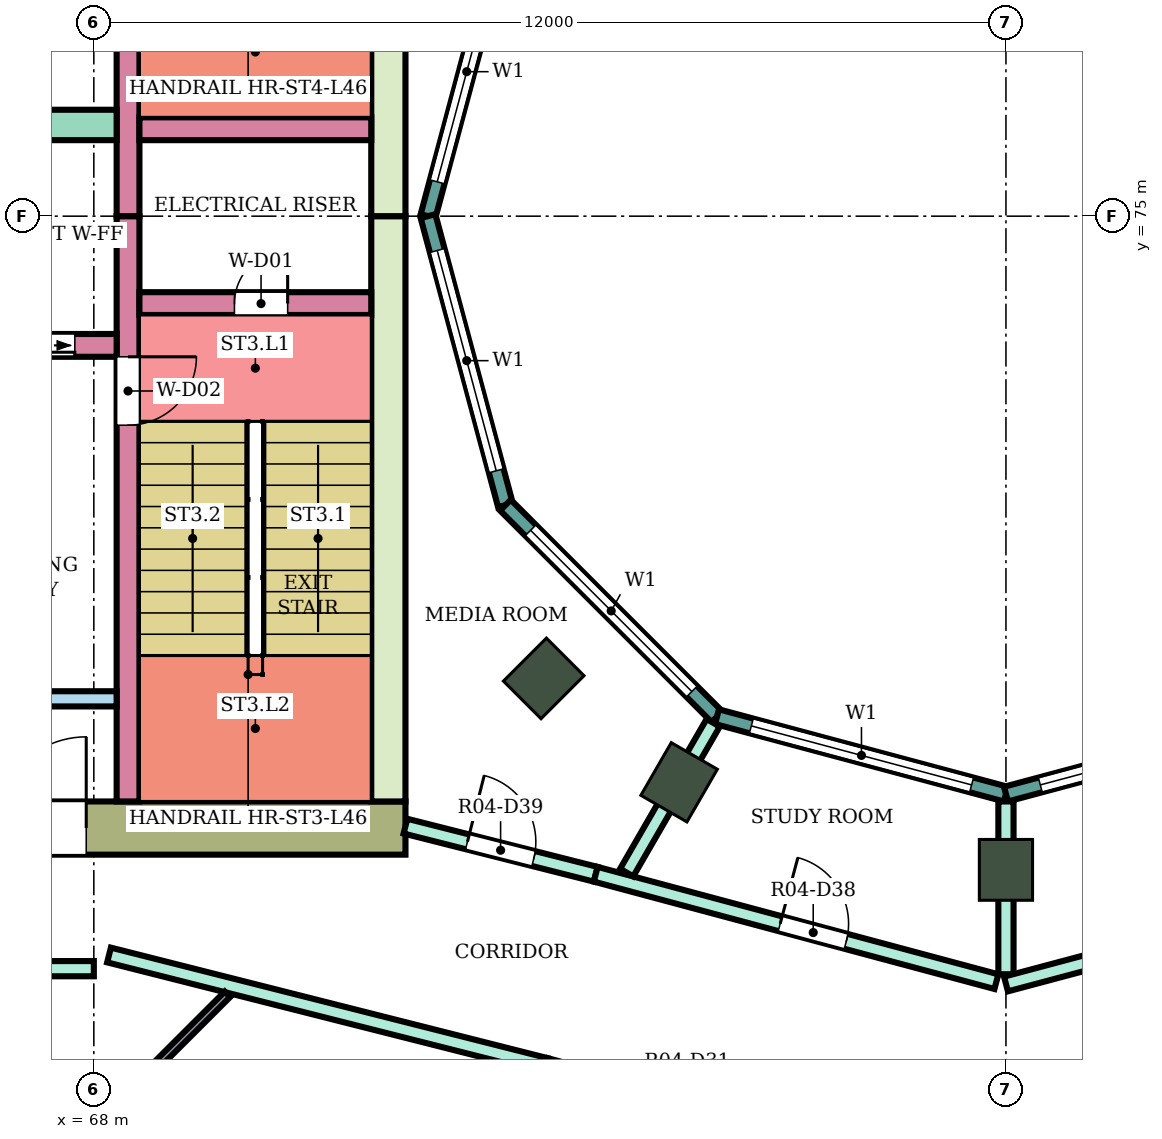
"""IFC4 building model, lengths in metres.
Left out: names, types, materials, properties, quantities, classifications, styles, units other than length and angle.
Written with IfcOpenShell. Run it as: python <this file> out.ifc"""

import sys

from ifc_helpers import new_model, si_unit, direction, frame, frame_2d, origin, origin_2d, place, context, subcontext, project, spatial, rectangle, extrude, element, fill, save


model = new_model("IFC4")
c1 = context("Model", 3, precision=1e-05, world=origin(), true_north=direction((0.0, 1.0)))
c2 = subcontext(c1, "Body", "Model", "MODEL_VIEW")
j1 = project(units=[si_unit("LENGTHUNIT", "METRE"), si_unit("PLANEANGLEUNIT", "RADIAN")], contexts=[c1])
p1 = place(None, origin())
s1 = spatial("IfcSite", under=j1, at=p1, CompositionType="ELEMENT")
p2 = place(p1, origin())
s2 = spatial("IfcBuilding", under=s1, at=p2, CompositionType="ELEMENT")
p3 = place(p2, frame((0.0, 0.0, 198.7)))
s3 = spatial("IfcBuildingStorey", under=s2, at=p3, CompositionType="ELEMENT", Elevation=198.7)
for number, where, z_axis, x_axis in (
    (1, (73.919, 68.919, 0.0), (0.0, 0.0, 1.0), (-0.707, -0.707, 0.0)),
    (2, (75.7, 67.552, 0.0), (0.0, 0.0, 1.0), (-0.5, -0.866, 0.0)),
    (3, (80.0, 66.4, 0.0), (0.0, 0.0, 1.0), (0.0, -1.0, 0.0)),
):
    element("IfcColumn", number, at=place(p3, frame(where, z_axis=z_axis, x_axis=x_axis)), inside=s3, PredefinedType="COLUMN", context=c2, shape_type="SweptSolid", body=[
        extrude(rectangle(XDim=0.8, YDim=0.7, at=origin_2d()), origin(), (0.0, 0.0, 1.0), 4.1),
    ])
p4 = place(p3, frame((72.1, 66.95, 0.0), z_axis=(0.0, 0.0, 1.0), x_axis=(-1.0, 0.0, 0.0)))
e4 = element("IfcWall", 4, at=p4, inside=s3, PredefinedType="SHEAR", context=c2, shape_type="SweptSolid", body=[
    extrude(rectangle(XDim=14.8, YDim=0.7, at=frame_2d((7.4, 0.0))), origin(), (0.0, 0.0, 1.0), 3.78),
])
p5 = place(p4, frame((4.2, 0.0, 0.0)))
e5 = element("IfcOpeningElement", 5, at=p5, cuts=e4, PredefinedType="OPENING", context=c2, shape_type="SweptSolid", body=[
    extrude(rectangle(XDim=2.4, YDim=2.4, at=frame_2d((1.2, 1.2))), frame((0.0, 0.36, 0.0), z_axis=(0.0, -1.0, 0.0), x_axis=(1.0, 0.0, 0.0)), (0.0, 0.0, 1.0), 0.72),
])
for number, where, z_axis, x_axis in (
    (6, (71.875, 75.0, 0.0), (0.0, 0.0, 1.0), (0.0, -1.0, 0.0)),
    (7, (71.875, 82.7, 0.0), (0.0, 0.0, 1.0), (0.0, -1.0, 0.0)),
):
    element("IfcWall", number, at=place(p3, frame(where, z_axis=z_axis, x_axis=x_axis)), inside=s3, PredefinedType="SHEAR", context=c2, shape_type="SweptSolid", body=[
        extrude(rectangle(XDim=7.7, YDim=0.45, at=frame_2d((3.85, 0.0))), origin(), (0.0, 0.0, 1.0), 3.78),
    ])
p6 = place(p3, frame((68.45, 75.0, 0.0), z_axis=(0.0, 0.0, 1.0), x_axis=(0.0, -1.0, 0.0)))
e8 = element("IfcWall", 8, at=p6, inside=s3, PredefinedType="SHEAR", context=c2, shape_type="SweptSolid", body=[
    extrude(rectangle(XDim=7.7, YDim=0.3, at=frame_2d((3.85, 0.0))), origin(), (0.0, 0.0, 1.0), 3.78),
])
p7 = place(p6, frame((1.85, 0.0, 0.0)))
e9 = element("IfcOpeningElement", 9, at=p7, cuts=e8, PredefinedType="OPENING", context=c2, shape_type="SweptSolid", body=[
    extrude(rectangle(XDim=0.9, YDim=2.1, at=frame_2d((0.45, 1.05))), frame((0.0, 0.16, 0.0), z_axis=(0.0, -1.0, 0.0), x_axis=(1.0, 0.0, 0.0)), (0.0, 0.0, 1.0), 0.32),
])
p8 = place(p3, frame((68.45, 82.7, 0.0), z_axis=(0.0, 0.0, 1.0), x_axis=(0.0, -1.0, 0.0)))
e10 = element("IfcWall", 10, at=p8, inside=s3, PredefinedType="SHEAR", context=c2, shape_type="SweptSolid", body=[
    extrude(rectangle(XDim=7.7, YDim=0.3, at=frame_2d((3.85, 0.0))), origin(), (0.0, 0.0, 1.0), 3.78),
])
p9 = place(p8, frame((0.35, 0.0, 0.0)))
e11 = element("IfcOpeningElement", 11, at=p9, cuts=e10, PredefinedType="OPENING", context=c2, shape_type="SweptSolid", body=[
    extrude(rectangle(XDim=0.9, YDim=2.1, at=frame_2d((0.45, 1.05))), frame((0.0, 0.16, 0.0), z_axis=(0.0, -1.0, 0.0), x_axis=(1.0, 0.0, 0.0)), (0.0, 0.0, 1.0), 0.32),
])
p10 = place(p3, frame((71.65, 73.85, 0.0), z_axis=(0.0, 0.0, 1.0), x_axis=(-1.0, 0.0, 0.0)))
e12 = element("IfcWall", 12, at=p10, inside=s3, PredefinedType="SHEAR", context=c2, shape_type="SweptSolid", body=[
    extrude(rectangle(XDim=3.05, YDim=0.3, at=frame_2d((1.525, 0.0))), origin(), (0.0, 0.0, 1.0), 3.78),
])
p11 = place(p10, frame((1.1, 0.0, 0.0)))
e13 = element("IfcOpeningElement", 13, at=p11, cuts=e12, PredefinedType="OPENING", context=c2, shape_type="SweptSolid", body=[
    extrude(rectangle(XDim=0.7, YDim=2.0, at=frame_2d((0.35, 1.0))), frame((0.0, 0.16, 0.0), z_axis=(0.0, -1.0, 0.0), x_axis=(1.0, 0.0, 0.0)), (0.0, 0.0, 1.0), 0.32),
])
p12 = place(p3, frame((71.65, 76.15, 0.0), z_axis=(0.0, 0.0, 1.0), x_axis=(-1.0, 0.0, 0.0)))
e14 = element("IfcWall", 14, at=p12, inside=s3, PredefinedType="SHEAR", context=c2, shape_type="SweptSolid", body=[
    extrude(rectangle(XDim=3.05, YDim=0.3, at=frame_2d((1.525, 0.0))), origin(), (0.0, 0.0, 1.0), 3.78),
])
p13 = place(p3, frame((68.3, 73.3, 0.0), z_axis=(0.0, 0.0, 1.0), x_axis=(-1.0, 0.0, 0.0)))
e15 = element("IfcWall", 15, at=p13, inside=s3, PredefinedType="SHEAR", context=c2, shape_type="SweptSolid", body=[
    extrude(rectangle(XDim=11.0, YDim=0.3, at=frame_2d((5.5, 0.0))), origin(), (0.0, 0.0, 1.0), 3.78),
])
p14 = place(p13, frame((0.55, 0.0, 0.0)))
e16 = element("IfcOpeningElement", 16, at=p14, cuts=e15, PredefinedType="OPENING", context=c2, shape_type="SweptSolid", body=[
    extrude(rectangle(XDim=1.1, YDim=2.1, at=frame_2d((0.55, 1.05))), frame((0.0, 0.16, 0.0), z_axis=(0.0, -1.0, 0.0), x_axis=(1.0, 0.0, 0.0)), (0.0, 0.0, 1.0), 0.32),
])
p15 = place(p13, frame((3.0, 0.0, 0.0)))
e17 = element("IfcOpeningElement", 17, at=p15, cuts=e15, PredefinedType="OPENING", context=c2, shape_type="SweptSolid", body=[
    extrude(rectangle(XDim=1.2, YDim=2.1, at=frame_2d((0.6, 1.05))), frame((0.0, 0.16, 0.0), z_axis=(0.0, -1.0, 0.0), x_axis=(1.0, 0.0, 0.0)), (0.0, 0.0, 1.0), 0.32),
])
p16 = place(p13, frame((5.5, 0.0, 0.0)))
e18 = element("IfcOpeningElement", 18, at=p16, cuts=e15, PredefinedType="OPENING", context=c2, shape_type="SweptSolid", body=[
    extrude(rectangle(XDim=1.2, YDim=2.1, at=frame_2d((0.6, 1.05))), frame((0.0, 0.16, 0.0), z_axis=(0.0, -1.0, 0.0), x_axis=(1.0, 0.0, 0.0)), (0.0, 0.0, 1.0), 0.32),
])
p17 = place(p13, frame((8.8, 0.0, 0.0)))
e19 = element("IfcOpeningElement", 19, at=p17, cuts=e15, PredefinedType="OPENING", context=c2, shape_type="SweptSolid", body=[
    extrude(rectangle(XDim=0.9, YDim=2.1, at=frame_2d((0.45, 1.05))), frame((0.0, 0.16, 0.0), z_axis=(0.0, -1.0, 0.0), x_axis=(1.0, 0.0, 0.0)), (0.0, 0.0, 1.0), 0.32),
])
p18 = place(p3, frame((68.3, 76.2, 0.0), z_axis=(0.0, 0.0, 1.0), x_axis=(-1.0, 0.0, 0.0)))
e20 = element("IfcWall", 20, at=p18, inside=s3, PredefinedType="SHEAR", context=c2, shape_type="SweptSolid", body=[
    extrude(rectangle(XDim=11.0, YDim=0.4, at=frame_2d((5.5, 0.0))), origin(), (0.0, 0.0, 1.0), 3.78),
])
p19 = place(p3, frame((68.3, 68.65, 0.0), z_axis=(0.0, 0.0, 1.0), x_axis=(-1.0, 0.0, 0.0)))
e21 = element("IfcWall", 21, at=p19, inside=s3, PredefinedType="SHEAR", context=c2, shape_type="SweptSolid", body=[
    extrude(rectangle(XDim=4.5, YDim=0.2, at=frame_2d((2.25, 0.0))), origin(), (0.0, 0.0, 1.0), 3.78),
])
p20 = place(p3, frame((73.415, 78.802, 0.0), z_axis=(0.0, 0.0, 1.0), x_axis=(-0.258789828301, -0.965933654434, 0.0)))
e22 = element("IfcWall", 22, at=p20, inside=s3, PredefinedType="NOTDEFINED", context=c2, shape_type="SweptSolid", body=[
    extrude(rectangle(XDim=3.936, YDim=0.2, at=frame_2d((1.968, 0.0))), origin(), (0.0, 0.0, 1.0), 4.1),
])
p21 = place(p20, frame((0.468, 0.0, 0.9)))
e23 = element("IfcOpeningElement", 23, at=p21, cuts=e22, PredefinedType="OPENING", context=c2, shape_type="SweptSolid", body=[
    extrude(rectangle(XDim=3.0, YDim=2.3, at=frame_2d((1.5, 1.15))), frame((0.0, 0.11, 0.0), z_axis=(0.0, -1.0, 0.0), x_axis=(1.0, 0.0, 0.0)), (0.0, 0.0, 1.0), 0.22),
])
p22 = place(p3, frame((72.396, 75.0, 0.0), z_axis=(0.0, 0.0, 1.0), x_axis=(0.258789828301, -0.965933654434, 0.0)))
e24 = element("IfcWall", 24, at=p22, inside=s3, PredefinedType="NOTDEFINED", context=c2, shape_type="SweptSolid", body=[
    extrude(rectangle(XDim=3.936, YDim=0.2, at=frame_2d((1.968, 0.0))), origin(), (0.0, 0.0, 1.0), 4.1),
])
p23 = place(p22, frame((0.468, 0.0, 0.9)))
e25 = element("IfcOpeningElement", 25, at=p23, cuts=e24, PredefinedType="OPENING", context=c2, shape_type="SweptSolid", body=[
    extrude(rectangle(XDim=3.0, YDim=2.3, at=frame_2d((1.5, 1.15))), frame((0.0, 0.11, 0.0), z_axis=(0.0, -1.0, 0.0), x_axis=(1.0, 0.0, 0.0)), (0.0, 0.0, 1.0), 0.22),
])
p24 = place(p3, frame((73.415, 71.198, 0.0), z_axis=(0.0, 0.0, 1.0), x_axis=(0.707106781187, -0.707106781187, 0.0)))
e26 = element("IfcWall", 26, at=p24, inside=s3, PredefinedType="NOTDEFINED", context=c2, shape_type="SweptSolid", body=[
    extrude(rectangle(XDim=3.936, YDim=0.2, at=frame_2d((1.968, 0.0))), origin(), (0.0, 0.0, 1.0), 4.1),
])
p25 = place(p24, frame((0.468, 0.0, 0.9)))
e27 = element("IfcOpeningElement", 27, at=p25, cuts=e26, PredefinedType="OPENING", context=c2, shape_type="SweptSolid", body=[
    extrude(rectangle(XDim=3.0, YDim=2.3, at=frame_2d((1.5, 1.15))), frame((0.0, 0.11, 0.0), z_axis=(0.0, -1.0, 0.0), x_axis=(1.0, 0.0, 0.0)), (0.0, 0.0, 1.0), 0.22),
])
p26 = place(p3, frame((76.198, 68.415, 0.0), z_axis=(0.0, 0.0, 1.0), x_axis=(0.965933654434, -0.258789828301, 0.0)))
e28 = element("IfcWall", 28, at=p26, inside=s3, PredefinedType="NOTDEFINED", context=c2, shape_type="SweptSolid", body=[
    extrude(rectangle(XDim=3.936, YDim=0.2, at=frame_2d((1.968, 0.0))), origin(), (0.0, 0.0, 1.0), 4.1),
])
p27 = place(p26, frame((0.468, 0.0, 0.9)))
e29 = element("IfcOpeningElement", 29, at=p27, cuts=e28, PredefinedType="OPENING", context=c2, shape_type="SweptSolid", body=[
    extrude(rectangle(XDim=3.0, YDim=2.3, at=frame_2d((1.5, 1.15))), frame((0.0, 0.11, 0.0), z_axis=(0.0, -1.0, 0.0), x_axis=(1.0, 0.0, 0.0)), (0.0, 0.0, 1.0), 0.22),
])
p28 = place(p3, frame((80.0, 67.396, 0.0), z_axis=(0.0, 0.0, 1.0), x_axis=(0.965933654434, 0.258789828301, 0.0)))
e30 = element("IfcWall", 30, at=p28, inside=s3, PredefinedType="NOTDEFINED", context=c2, shape_type="SweptSolid", body=[
    extrude(rectangle(XDim=3.936, YDim=0.2, at=frame_2d((1.968, 0.0))), origin(), (0.0, 0.0, 1.0), 4.1),
])
p29 = place(p28, frame((0.468, 0.0, 0.9)))
e31 = element("IfcOpeningElement", 31, at=p29, cuts=e30, PredefinedType="OPENING", context=c2, shape_type="SweptSolid", body=[
    extrude(rectangle(XDim=3.0, YDim=2.3, at=frame_2d((1.5, 1.15))), frame((0.0, 0.11, 0.0), z_axis=(0.0, -1.0, 0.0), x_axis=(1.0, 0.0, 0.0)), (0.0, 0.0, 1.0), 0.22),
])
p30 = place(p3, frame((65.2, 65.1, 0.0), z_axis=(0.0, 0.0, 1.0), x_axis=(1.0, 0.0, 0.0)))
e32 = element("IfcWall", 32, at=p30, inside=s3, PredefinedType="PARTITIONING", context=c2, shape_type="SweptSolid", body=[
    extrude(rectangle(XDim=2.8, YDim=0.2, at=frame_2d((1.4, 0.0))), origin(), (0.0, 0.0, 1.0), 3.65),
])
p31 = place(p3, frame((68.2, 65.28, 0.0), z_axis=(0.0, 0.0, 1.0), x_axis=(0.969450596516, -0.245286650503, 0.0)))
e33 = element("IfcWall", 33, at=p31, inside=s3, PredefinedType="PARTITIONING", context=c2, shape_type="SweptSolid", body=[
    extrude(rectangle(XDim=5.928, YDim=0.2, at=frame_2d((2.964, 0.0))), origin(), (0.0, 0.0, 1.0), 3.65),
])
p32 = place(p3, frame((72.1, 66.975, 0.0), z_axis=(0.0, 0.0, 1.0), x_axis=(0.969471314457, -0.245204752086, 0.0)))
e34 = element("IfcWall", 34, at=p32, inside=s3, PredefinedType="PARTITIONING", context=c2, shape_type="SweptSolid", body=[
    extrude(rectangle(XDim=2.582, YDim=0.2, at=frame_2d((1.291, 0.0))), origin(), (0.0, 0.0, 1.0), 3.65),
])
p33 = place(p32, frame((0.841, 0.0, 0.0)))
e35 = element("IfcOpeningElement", 35, at=p33, cuts=e34, PredefinedType="OPENING", context=c2, shape_type="SweptSolid", body=[
    extrude(rectangle(XDim=0.9, YDim=2.1, at=frame_2d((0.45, 1.05))), frame((0.0, 0.11, 0.0), z_axis=(0.0, -1.0, 0.0), x_axis=(1.0, 0.0, 0.0)), (0.0, 0.0, 1.0), 0.22),
])
p34 = place(p3, frame((73.947, 63.826, 0.0), z_axis=(0.0, 0.0, 1.0), x_axis=(0.965908253407, -0.258884619088, 0.0)))
e36 = element("IfcWall", 36, at=p34, inside=s3, PredefinedType="PARTITIONING", context=c2, shape_type="SweptSolid", body=[
    extrude(rectangle(XDim=6.217, YDim=0.2, at=frame_2d((3.108, 0.0))), origin(), (0.0, 0.0, 1.0), 3.65),
])
p35 = place(p34, frame((1.424, 0.0, 0.0)))
e37 = element("IfcOpeningElement", 37, at=p35, cuts=e36, PredefinedType="OPENING", context=c2, shape_type="SweptSolid", body=[
    extrude(rectangle(XDim=1.0, YDim=2.1, at=frame_2d((0.5, 1.05))), frame((0.0, 0.11, 0.0), z_axis=(0.0, -1.0, 0.0), x_axis=(1.0, 0.0, 0.0)), (0.0, 0.0, 1.0), 0.22),
])
p36 = place(p3, frame((74.603, 66.342, 0.0), z_axis=(0.0, 0.0, 1.0), x_axis=(0.965920893652, -0.258837453254, 0.0)))
e38 = element("IfcWall", 38, at=p36, inside=s3, PredefinedType="PARTITIONING", context=c2, shape_type="SweptSolid", body=[
    extrude(rectangle(XDim=5.458, YDim=0.2, at=frame_2d((2.729, 0.0))), origin(), (0.0, 0.0, 1.0), 3.65),
])
p37 = place(p36, frame((2.512, 0.0, 0.0)))
e39 = element("IfcOpeningElement", 39, at=p37, cuts=e38, PredefinedType="OPENING", context=c2, shape_type="SweptSolid", body=[
    extrude(rectangle(XDim=0.9, YDim=2.1, at=frame_2d((0.45, 1.05))), frame((0.0, 0.11, 0.0), z_axis=(0.0, -1.0, 0.0), x_axis=(1.0, 0.0, 0.0)), (0.0, 0.0, 1.0), 0.22),
])
p38 = place(p3, frame((75.01, 66.364, 0.0), z_axis=(0.0, 0.0, 1.0), x_axis=(0.500097042406, 0.865969369075, 0.0)))
e40 = element("IfcWall", 40, at=p38, inside=s3, PredefinedType="PARTITIONING", context=c2, shape_type="SweptSolid", body=[
    extrude(rectangle(XDim=2.275, YDim=0.2, at=frame_2d((1.138, 0.0))), origin(), (0.0, 0.0, 1.0), 3.65),
])
p39 = place(p3, frame((80.048, 62.217, 0.0), z_axis=(0.0, 0.0, 1.0), x_axis=(0.966097920642, 0.258175923996, 0.0)))
e41 = element("IfcWall", 41, at=p39, inside=s3, PredefinedType="PARTITIONING", context=c2, shape_type="SweptSolid", body=[
    extrude(rectangle(XDim=6.217, YDim=0.2, at=frame_2d((3.108, 0.0))), origin(), (0.0, 0.0, 1.0), 3.65),
])
p40 = place(p39, frame((3.792, 0.0, 0.0)))
e42 = element("IfcOpeningElement", 42, at=p40, cuts=e41, PredefinedType="OPENING", context=c2, shape_type="SweptSolid", body=[
    extrude(rectangle(XDim=1.0, YDim=2.1, at=frame_2d((0.5, 1.05))), frame((0.0, 0.11, 0.0), z_axis=(0.0, -1.0, 0.0), x_axis=(1.0, 0.0, 0.0)), (0.0, 0.0, 1.0), 0.22),
])
p41 = place(p3, frame((80.0, 65.027, 0.0), z_axis=(0.0, 0.0, 1.0), x_axis=(0.0, 1.0, 0.0)))
e43 = element("IfcWall", 43, at=p41, inside=s3, PredefinedType="PARTITIONING", context=c2, shape_type="SweptSolid", body=[
    extrude(rectangle(XDim=2.273, YDim=0.2, at=frame_2d((1.136, 0.0))), origin(), (0.0, 0.0, 1.0), 3.65),
])
p42 = place(p3, frame((80.0, 64.898, 0.0), z_axis=(0.0, 0.0, 1.0), x_axis=(0.966236923997, 0.25765520896, 0.0)))
e44 = element("IfcWall", 44, at=p42, inside=s3, PredefinedType="PARTITIONING", context=c2, shape_type="SweptSolid", body=[
    extrude(rectangle(XDim=8.168, YDim=0.2, at=frame_2d((4.084, 0.0))), origin(), (0.0, 0.0, 1.0), 3.65),
])
p43 = place(p42, frame((1.893, 0.0, 0.0)))
e45 = element("IfcOpeningElement", 45, at=p43, cuts=e44, PredefinedType="OPENING", context=c2, shape_type="SweptSolid", body=[
    extrude(rectangle(XDim=1.8, YDim=2.1, at=frame_2d((0.9, 1.05))), frame((0.0, 0.11, 0.0), z_axis=(0.0, -1.0, 0.0), x_axis=(1.0, 0.0, 0.0)), (0.0, 0.0, 1.0), 0.22),
])
p44 = place(p3, frame((63.592, 58.6, 0.0), z_axis=(0.0, 0.0, 1.0), x_axis=(0.707260766325, 0.706952762508, 0.0)))
e46 = element("IfcWall", 46, at=p44, inside=s3, PredefinedType="PARTITIONING", context=c2, shape_type="SweptSolid", body=[
    extrude(rectangle(XDim=8.719, YDim=0.1, at=frame_2d((4.36, 0.0))), origin(), (0.0, 0.0, 1.0), 3.65),
])
p45 = place(p44, frame((1.772, 0.0, 0.0)))
e47 = element("IfcOpeningElement", 47, at=p45, cuts=e46, PredefinedType="OPENING", context=c2, shape_type="SweptSolid", body=[
    extrude(rectangle(XDim=0.9, YDim=2.1, at=frame_2d((0.45, 1.05))), frame((0.0, 0.06, 0.0), z_axis=(0.0, -1.0, 0.0), x_axis=(1.0, 0.0, 0.0)), (0.0, 0.0, 1.0), 0.12),
])
p46 = place(p21, origin())
e48 = element("IfcWindow", 48, at=p46, inside=s3, PartitioningType="SINGLE_PANEL", PredefinedType="WINDOW", context=c2, shape_type="SweptSolid", body=[
    extrude(rectangle(XDim=3.0, YDim=2.3, at=frame_2d((1.5, 1.15))), frame((0.0, 0.03, 0.0), z_axis=(0.0, -1.0, 0.0), x_axis=(1.0, 0.0, 0.0)), (0.0, 0.0, 1.0), 0.06),
])
fill(e23, e48)
p47 = place(p23, origin())
e49 = element("IfcWindow", 49, at=p47, inside=s3, PartitioningType="SINGLE_PANEL", PredefinedType="WINDOW", context=c2, shape_type="SweptSolid", body=[
    extrude(rectangle(XDim=3.0, YDim=2.3, at=frame_2d((1.5, 1.15))), frame((0.0, 0.03, 0.0), z_axis=(0.0, -1.0, 0.0), x_axis=(1.0, 0.0, 0.0)), (0.0, 0.0, 1.0), 0.06),
])
fill(e25, e49)
p48 = place(p25, origin())
e50 = element("IfcWindow", 50, at=p48, inside=s3, PartitioningType="SINGLE_PANEL", PredefinedType="WINDOW", context=c2, shape_type="SweptSolid", body=[
    extrude(rectangle(XDim=3.0, YDim=2.3, at=frame_2d((1.5, 1.15))), frame((0.0, 0.03, 0.0), z_axis=(0.0, -1.0, 0.0), x_axis=(1.0, 0.0, 0.0)), (0.0, 0.0, 1.0), 0.06),
])
fill(e27, e50)
p49 = place(p27, origin())
e51 = element("IfcWindow", 51, at=p49, inside=s3, PartitioningType="SINGLE_PANEL", PredefinedType="WINDOW", context=c2, shape_type="SweptSolid", body=[
    extrude(rectangle(XDim=3.0, YDim=2.3, at=frame_2d((1.5, 1.15))), frame((0.0, 0.03, 0.0), z_axis=(0.0, -1.0, 0.0), x_axis=(1.0, 0.0, 0.0)), (0.0, 0.0, 1.0), 0.06),
])
fill(e29, e51)
p50 = place(p29, origin())
e52 = element("IfcWindow", 52, at=p50, inside=s3, PartitioningType="SINGLE_PANEL", PredefinedType="WINDOW", context=c2, shape_type="SweptSolid", body=[
    extrude(rectangle(XDim=3.0, YDim=2.3, at=frame_2d((1.5, 1.15))), frame((0.0, 0.03, 0.0), z_axis=(0.0, -1.0, 0.0), x_axis=(1.0, 0.0, 0.0)), (0.0, 0.0, 1.0), 0.06),
])
fill(e31, e52)
p51 = place(p37, origin())
e53 = element("IfcDoor", 53, at=p51, inside=s3, OperationType="SINGLE_SWING_LEFT", PredefinedType="DOOR", context=c2, shape_type="SweptSolid", body=[
    extrude(rectangle(XDim=0.9, YDim=2.1, at=frame_2d((0.45, 1.05))), frame((0.0, 0.025, 0.0), z_axis=(0.0, -1.0, 0.0), x_axis=(1.0, 0.0, 0.0)), (0.0, 0.0, 1.0), 0.05),
])
fill(e39, e53)
p52 = place(p33, origin())
e54 = element("IfcDoor", 54, at=p52, inside=s3, OperationType="SINGLE_SWING_LEFT", PredefinedType="DOOR", context=c2, shape_type="SweptSolid", body=[
    extrude(rectangle(XDim=0.9, YDim=2.1, at=frame_2d((0.45, 1.05))), frame((0.0, 0.025, 0.0), z_axis=(0.0, -1.0, 0.0), x_axis=(1.0, 0.0, 0.0)), (0.0, 0.0, 1.0), 0.05),
])
fill(e35, e54)
p53 = place(p11, frame((0.7, 0.0, 0.0), z_axis=(0.0, 0.0, 1.0), x_axis=(-1.0, 0.0, 0.0)))
e55 = element("IfcDoor", 55, at=p53, inside=s3, OperationType="SINGLE_SWING_RIGHT", PredefinedType="DOOR", context=c2, shape_type="SweptSolid", body=[
    extrude(rectangle(XDim=0.7, YDim=2.0, at=frame_2d((0.35, 1.0))), frame((0.0, 0.025, 0.0), z_axis=(0.0, -1.0, 0.0), x_axis=(1.0, 0.0, 0.0)), (0.0, 0.0, 1.0), 0.05),
])
fill(e13, e55)
p54 = place(p7, origin())
e56 = element("IfcDoor", 56, at=p54, inside=s3, OperationType="SINGLE_SWING_LEFT", PredefinedType="DOOR", context=c2, shape_type="SweptSolid", body=[
    extrude(rectangle(XDim=0.9, YDim=2.1, at=frame_2d((0.45, 1.05))), frame((0.0, 0.025, 0.0), z_axis=(0.0, -1.0, 0.0), x_axis=(1.0, 0.0, 0.0)), (0.0, 0.0, 1.0), 0.05),
])
fill(e9, e56)
p55 = place(p14, origin())
e57 = element("IfcDoor", 57, at=p55, inside=s3, OperationType="DOUBLE_DOOR_SLIDING", PredefinedType="DOOR", context=c2, shape_type="SweptSolid", body=[
    extrude(rectangle(XDim=1.1, YDim=2.1, at=frame_2d((0.55, 1.05))), frame((0.0, 0.025, 0.0), z_axis=(0.0, -1.0, 0.0), x_axis=(1.0, 0.0, 0.0)), (0.0, 0.0, 1.0), 0.05),
])
fill(e16, e57)
p56 = place(p5, frame((2.4, 0.0, 0.0), z_axis=(0.0, 0.0, 1.0), x_axis=(-1.0, 0.0, 0.0)))
e58 = element("IfcDoor", 58, at=p56, inside=s3, OperationType="DOUBLE_DOOR_SINGLE_SWING", PredefinedType="DOOR", context=c2, shape_type="SweptSolid", body=[
    extrude(rectangle(XDim=2.4, YDim=2.4, at=frame_2d((1.2, 1.2))), frame((0.0, 0.025, 0.0), z_axis=(0.0, -1.0, 0.0), x_axis=(1.0, 0.0, 0.0)), (0.0, 0.0, 1.0), 0.05),
])
fill(e5, e58)
save(model, sys.argv[1])
